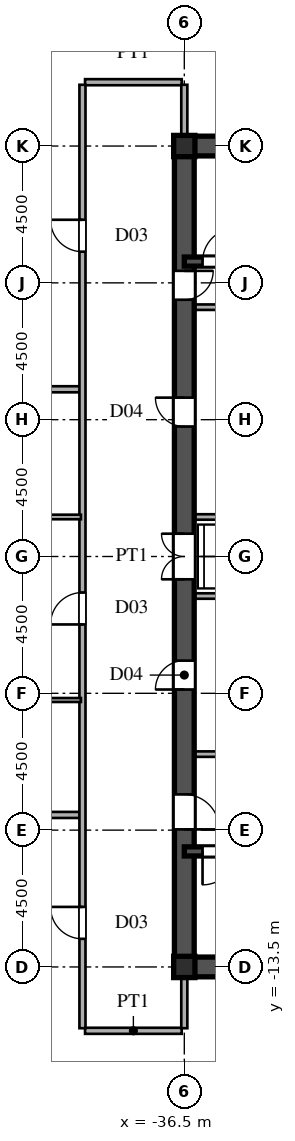
"""IFC4 building model, lengths in metres.
Left out: names, types, materials, properties, quantities, classifications, styles, units other than length and angle.
Written with IfcOpenShell. Run it as: python <this file> out.ifc"""

import sys

from ifc_helpers import new_model, si_unit, direction, frame, frame_2d, origin, origin_2d, place, context, subcontext, project, spatial, rectangle, i_section, extrude, source, transform, mapped, element, fill, save


model = new_model("IFC4")
c1 = context("Model", 3, precision=1e-05, world=origin(), true_north=direction((0.0, 1.0)))
c2 = subcontext(c1, "Body", "Model", "MODEL_VIEW")
j1 = project(units=[si_unit("LENGTHUNIT", "METRE"), si_unit("PLANEANGLEUNIT", "RADIAN")], contexts=[c1])
p1 = place(None, origin())
s1 = spatial("IfcSite", under=j1, at=p1, CompositionType="ELEMENT")
p2 = place(p1, origin())
s2 = spatial("IfcBuilding", under=s1, at=p2, CompositionType="ELEMENT")
p3 = place(p2, frame((0.0, 0.0, 128.4)))
s3 = spatial("IfcBuildingStorey", under=s2, at=p3, CompositionType="ELEMENT", Elevation=128.4)
m1 = source(origin(), c2, "Body", "SweptSolid", [
    extrude(i_section(OverallWidth=0.7, OverallDepth=0.7, WebThickness=0.028, FlangeThickness=0.045, at=origin_2d()), origin(), (0.0, 0.0, 1.0), 3.6),
])
for number, where, z_axis, x_axis in (
    (1, (-36.5, -13.5, 0.0), (0.0, 0.0, 1.0), (1.0, 0.0, 0.0)),
    (2, (-36.5, 13.5, 0.0), (0.0, 0.0, 1.0), (1.0, 0.0, 0.0)),
):
    element("IfcColumn", number, at=place(p3, frame(where, z_axis=z_axis, x_axis=x_axis)), inside=s3, PredefinedType="COLUMN", context=c2, shape_type="MappedRepresentation", body=[
        mapped(m1, transform((0.0, 0.0, 0.0), scale=1.0)),
    ])
for number, where, z_axis, x_axis in (
    (3, (-36.5, -13.5, 0.0), (0.0, 0.0, 1.0), (1.0, 0.0, 0.0)),
    (4, (-36.5, 13.5, 0.0), (0.0, 0.0, 1.0), (1.0, 0.0, 0.0)),
):
    element("IfcWall", number, at=place(p3, frame(where, z_axis=z_axis, x_axis=x_axis)), inside=s3, PredefinedType="SHEAR", context=c2, shape_type="SweptSolid", body=[
        extrude(rectangle(XDim=9.0, YDim=0.65, at=frame_2d((4.5, 0.0))), origin(), (0.0, 0.0, 1.0), 3.38),
    ])
p4 = place(p3, frame((-36.5, -13.65, 0.0), z_axis=(0.0, 0.0, 1.0), x_axis=(0.0, 1.0, 0.0)))
e5 = element("IfcWall", 5, at=p4, inside=s3, PredefinedType="SHEAR", context=c2, shape_type="SweptSolid", body=[
    extrude(rectangle(XDim=7.15, YDim=0.65, at=frame_2d((3.575, 0.0))), origin(), (0.0, 0.0, 1.0), 3.38),
])
p5 = place(p4, frame((4.675, 0.0, 0.0)))
e6 = element("IfcOpeningElement", 6, at=p5, cuts=e5, PredefinedType="OPENING", context=c2, shape_type="SweptSolid", body=[
    extrude(rectangle(XDim=1.15, YDim=2.2, at=frame_2d((0.575, 1.1))), frame((0.0, 0.335, 0.0), z_axis=(0.0, -1.0, 0.0), x_axis=(1.0, 0.0, 0.0)), (0.0, 0.0, 1.0), 0.67),
])
p6 = place(p3, frame((-36.5, -1.3, 0.0), z_axis=(0.0, 0.0, 1.0), x_axis=(0.0, 1.0, 0.0)))
e7 = element("IfcWall", 7, at=p6, inside=s3, PredefinedType="SHEAR", context=c2, shape_type="SweptSolid", body=[
    extrude(rectangle(XDim=2.6, YDim=0.65, at=frame_2d((1.3, 0.0))), origin(), (0.0, 0.0, 1.0), 3.38),
])
p7 = place(p6, frame((0.55, 0.0, 0.0)))
e8 = element("IfcOpeningElement", 8, at=p7, cuts=e7, PredefinedType="OPENING", context=c2, shape_type="SweptSolid", body=[
    extrude(rectangle(XDim=1.5, YDim=2.3, at=frame_2d((0.75, 1.15))), frame((0.0, 0.335, 0.0), z_axis=(0.0, -1.0, 0.0), x_axis=(1.0, 0.0, 0.0)), (0.0, 0.0, 1.0), 0.67),
])
p8 = place(p3, frame((-36.5, 8.2, 0.0), z_axis=(0.0, 0.0, 1.0), x_axis=(0.0, 1.0, 0.0)))
e9 = element("IfcWall", 9, at=p8, inside=s3, PredefinedType="SHEAR", context=c2, shape_type="SweptSolid", body=[
    extrude(rectangle(XDim=5.45, YDim=0.65, at=frame_2d((2.725, 0.0))), origin(), (0.0, 0.0, 1.0), 3.38),
])
p9 = place(p8, frame((0.245, 0.0, 0.0)))
e10 = element("IfcOpeningElement", 10, at=p9, cuts=e9, PredefinedType="OPENING", context=c2, shape_type="SweptSolid", body=[
    extrude(rectangle(XDim=0.95, YDim=2.15, at=frame_2d((0.475, 1.075))), frame((0.0, 0.335, 0.0), z_axis=(0.0, -1.0, 0.0), x_axis=(1.0, 0.0, 0.0)), (0.0, 0.0, 1.0), 0.67),
])
p10 = place(p3, frame((-36.5, -6.5, 0.0), z_axis=(0.0, 0.0, 1.0), x_axis=(0.0, 1.0, 0.0)))
e11 = element("IfcWall", 11, at=p10, inside=s3, PredefinedType="SHEAR", context=c2, shape_type="SweptSolid", body=[
    extrude(rectangle(XDim=5.2, YDim=0.65, at=frame_2d((2.6, 0.0))), origin(), (0.0, 0.0, 1.0), 3.38),
])
p11 = place(p10, frame((2.125, 0.0, 0.0)))
e12 = element("IfcOpeningElement", 12, at=p11, cuts=e11, PredefinedType="OPENING", context=c2, shape_type="SweptSolid", body=[
    extrude(rectangle(XDim=0.95, YDim=2.15, at=frame_2d((0.475, 1.075))), frame((0.0, 0.335, 0.0), z_axis=(0.0, -1.0, 0.0), x_axis=(1.0, 0.0, 0.0)), (0.0, 0.0, 1.0), 0.67),
])
p12 = place(p3, frame((-36.5, 1.3, 0.0), z_axis=(0.0, 0.0, 1.0), x_axis=(0.0, 1.0, 0.0)))
e13 = element("IfcWall", 13, at=p12, inside=s3, PredefinedType="SHEAR", context=c2, shape_type="SweptSolid", body=[
    extrude(rectangle(XDim=6.9, YDim=0.65, at=frame_2d((3.45, 0.0))), origin(), (0.0, 0.0, 1.0), 3.38),
])
p13 = place(p12, frame((2.975, 0.0, 0.0)))
e14 = element("IfcOpeningElement", 14, at=p13, cuts=e13, PredefinedType="OPENING", context=c2, shape_type="SweptSolid", body=[
    extrude(rectangle(XDim=0.95, YDim=2.15, at=frame_2d((0.475, 1.075))), frame((0.0, 0.335, 0.0), z_axis=(0.0, -1.0, 0.0), x_axis=(1.0, 0.0, 0.0)), (0.0, 0.0, 1.0), 0.67),
])
p14 = place(p3, frame((-36.5, -9.7, 0.0), z_axis=(0.0, 0.0, 1.0), x_axis=(1.0, 0.0, 0.0)))
e15 = element("IfcWall", 15, at=p14, inside=s3, PredefinedType="SHEAR", context=c2, shape_type="SweptSolid", body=[
    extrude(rectangle(XDim=9.0, YDim=0.3, at=frame_2d((4.5, 0.0))), origin(), (0.0, 0.0, 1.0), 3.38),
])
p15 = place(p14, frame((0.6, 0.0, 0.0)))
e16 = element("IfcOpeningElement", 16, at=p15, cuts=e15, PredefinedType="OPENING", context=c2, shape_type="SweptSolid", body=[
    extrude(rectangle(XDim=1.1, YDim=2.2, at=frame_2d((0.55, 1.1))), frame((0.0, 0.16, 0.0), z_axis=(0.0, -1.0, 0.0), x_axis=(1.0, 0.0, 0.0)), (0.0, 0.0, 1.0), 0.32),
])
p16 = place(p3, frame((-36.5, 9.7, 0.0), z_axis=(0.0, 0.0, 1.0), x_axis=(1.0, 0.0, 0.0)))
e17 = element("IfcWall", 17, at=p16, inside=s3, PredefinedType="SHEAR", context=c2, shape_type="SweptSolid", body=[
    extrude(rectangle(XDim=9.0, YDim=0.3, at=frame_2d((4.5, 0.0))), origin(), (0.0, 0.0, 1.0), 3.38),
])
p17 = place(p16, frame((0.6, 0.0, 0.0)))
e18 = element("IfcOpeningElement", 18, at=p17, cuts=e17, PredefinedType="OPENING", context=c2, shape_type="SweptSolid", body=[
    extrude(rectangle(XDim=1.1, YDim=2.2, at=frame_2d((0.55, 1.1))), frame((0.0, 0.16, 0.0), z_axis=(0.0, -1.0, 0.0), x_axis=(1.0, 0.0, 0.0)), (0.0, 0.0, 1.0), 0.32),
])
for number, where, z_axis, x_axis in (
    (19, (-36.15, -6.5, 0.0), (0.0, 0.0, 1.0), (1.0, 0.0, 0.0)),
    (20, (-36.15, 8.2, 0.0), (0.0, 0.0, 1.0), (1.0, 0.0, 0.0)),
):
    element("IfcWall", number, at=place(p3, frame(where, z_axis=z_axis, x_axis=x_axis)), inside=s3, PredefinedType="PARTITIONING", context=c2, shape_type="SweptSolid", body=[
        extrude(rectangle(XDim=5.7, YDim=0.18, at=frame_2d((2.85, 0.0))), origin(), (0.0, 0.0, 1.0), 3.38),
    ])
for number, where, z_axis, x_axis in (
    (21, (-36.15, -1.3, 0.0), (0.0, 0.0, 1.0), (1.0, 0.0, 0.0)),
    (22, (-36.15, 1.3, 0.0), (0.0, 0.0, 1.0), (1.0, 0.0, 0.0)),
):
    element("IfcWall", number, at=place(p3, frame(where, z_axis=z_axis, x_axis=x_axis)), inside=s3, PredefinedType="PARTITIONING", context=c2, shape_type="SweptSolid", body=[
        extrude(rectangle(XDim=2.95, YDim=0.18, at=frame_2d((1.475, 0.0))), origin(), (0.0, 0.0, 1.0), 3.38),
    ])
p18 = place(p3, frame((-39.765, -15.6, 0.0), z_axis=(0.0, 0.0, 1.0), x_axis=(1.0, 0.0, 0.0)))
e23 = element("IfcWall", 23, at=p18, inside=s3, PredefinedType="PARTITIONING", context=c2, shape_type="SweptSolid", body=[
    extrude(rectangle(XDim=3.18, YDim=0.2, at=frame_2d((1.59, 0.0))), origin(), (0.0, 0.0, 1.0), 3.38),
])
p19 = place(p3, frame((-62.69, -8.5, 0.0), z_axis=(0.0, 0.0, 1.0), x_axis=(1.0, 0.0, 0.0)))
e24 = element("IfcWall", 24, at=p19, inside=s3, PredefinedType="PARTITIONING", context=c2, shape_type="SweptSolid", body=[
    extrude(rectangle(XDim=22.76, YDim=0.2, at=frame_2d((11.38, 0.0))), origin(), (0.0, 0.0, 1.0), 3.38),
])
p20 = place(p3, frame((-45.45, -4.72, 0.0), z_axis=(0.0, 0.0, 1.0), x_axis=(1.0, 0.0, 0.0)))
e25 = element("IfcWall", 25, at=p20, inside=s3, PredefinedType="PARTITIONING", context=c2, shape_type="SweptSolid", body=[
    extrude(rectangle(XDim=5.55, YDim=0.13, at=frame_2d((2.775, 0.0))), origin(), (0.0, 0.0, 1.0), 3.38),
])
p21 = place(p20, frame((2.335, 0.0, 0.0)))
e26 = element("IfcOpeningElement", 26, at=p21, cuts=e25, PredefinedType="OPENING", context=c2, shape_type="SweptSolid", body=[
    extrude(rectangle(XDim=0.88, YDim=2.1, at=frame_2d((0.44, 1.05))), frame((0.0, 0.075, 0.0), z_axis=(0.0, -1.0, 0.0), x_axis=(1.0, 0.0, 0.0)), (0.0, 0.0, 1.0), 0.15),
])
p22 = place(p3, frame((-45.45, 1.3, 0.0), z_axis=(0.0, 0.0, 1.0), x_axis=(1.0, 0.0, 0.0)))
e27 = element("IfcWall", 27, at=p22, inside=s3, PredefinedType="PARTITIONING", context=c2, shape_type="SweptSolid", body=[
    extrude(rectangle(XDim=5.55, YDim=0.15, at=frame_2d((2.775, 0.0))), origin(), (0.0, 0.0, 1.0), 3.38),
])
p23 = place(p22, frame((2.3, 0.0, 0.0)))
e28 = element("IfcOpeningElement", 28, at=p23, cuts=e27, PredefinedType="OPENING", context=c2, shape_type="SweptSolid", body=[
    extrude(rectangle(XDim=0.95, YDim=2.15, at=frame_2d((0.475, 1.075))), frame((0.0, 0.085, 0.0), z_axis=(0.0, -1.0, 0.0), x_axis=(1.0, 0.0, 0.0)), (0.0, 0.0, 1.0), 0.17),
])
p24 = place(p3, frame((-68.458, 5.5, 0.0), z_axis=(0.0, 0.0, 1.0), x_axis=(1.0, 0.0, 0.0)))
e29 = element("IfcWall", 29, at=p24, inside=s3, PredefinedType="PARTITIONING", context=c2, shape_type="SweptSolid", body=[
    extrude(rectangle(XDim=28.529, YDim=0.2, at=frame_2d((14.264, 0.0))), origin(), (0.0, 0.0, 1.0), 3.38),
])
p25 = place(p3, frame((-39.765, 15.6, 0.0), z_axis=(0.0, 0.0, 1.0), x_axis=(1.0, 0.0, 0.0)))
e30 = element("IfcWall", 30, at=p25, inside=s3, PredefinedType="PARTITIONING", context=c2, shape_type="SweptSolid", body=[
    extrude(rectangle(XDim=3.18, YDim=0.2, at=frame_2d((1.59, 0.0))), origin(), (0.0, 0.0, 1.0), 3.38),
])
p26 = place(p3, frame((-39.85, -15.515, 0.0), z_axis=(0.0, 0.0, 1.0), x_axis=(0.0, 1.0, 0.0)))
e31 = element("IfcWall", 31, at=p26, inside=s3, PredefinedType="PARTITIONING", context=c2, shape_type="SweptSolid", body=[
    extrude(rectangle(XDim=31.03, YDim=0.2, at=frame_2d((15.515, 0.0))), origin(), (0.0, 0.0, 1.0), 3.38),
])
p27 = place(p26, frame((2.94, 0.0, 0.0)))
e32 = element("IfcOpeningElement", 32, at=p27, cuts=e31, PredefinedType="OPENING", context=c2, shape_type="SweptSolid", body=[
    extrude(rectangle(XDim=1.05, YDim=2.25, at=frame_2d((0.525, 1.125))), frame((0.0, 0.11, 0.0), z_axis=(0.0, -1.0, 0.0), x_axis=(1.0, 0.0, 0.0)), (0.0, 0.0, 1.0), 0.22),
])
p28 = place(p26, frame((13.28, 0.0, 0.0)))
e33 = element("IfcOpeningElement", 33, at=p28, cuts=e31, PredefinedType="OPENING", context=c2, shape_type="SweptSolid", body=[
    extrude(rectangle(XDim=1.05, YDim=2.25, at=frame_2d((0.525, 1.125))), frame((0.0, 0.11, 0.0), z_axis=(0.0, -1.0, 0.0), x_axis=(1.0, 0.0, 0.0)), (0.0, 0.0, 1.0), 0.22),
])
p29 = place(p26, frame((25.54, 0.0, 0.0)))
e34 = element("IfcOpeningElement", 34, at=p29, cuts=e31, PredefinedType="OPENING", context=c2, shape_type="SweptSolid", body=[
    extrude(rectangle(XDim=1.05, YDim=2.25, at=frame_2d((0.525, 1.125))), frame((0.0, 0.11, 0.0), z_axis=(0.0, -1.0, 0.0), x_axis=(1.0, 0.0, 0.0)), (0.0, 0.0, 1.0), 0.22),
])
for number, where, z_axis, x_axis in (
    (35, (-36.5, -15.515, 0.0), (0.0, 0.0, 1.0), (0.0, 1.0, 0.0)),
    (36, (-36.5, 13.83, 0.0), (0.0, 0.0, 1.0), (0.0, 1.0, 0.0)),
):
    element("IfcWall", number, at=place(p3, frame(where, z_axis=z_axis, x_axis=x_axis)), inside=s3, PredefinedType="PARTITIONING", context=c2, shape_type="SweptSolid", body=[
        extrude(rectangle(XDim=1.685, YDim=0.2, at=frame_2d((0.842, 0.0))), origin(), (0.0, 0.0, 1.0), 2.78),
    ])
m2 = source(origin(), c2, "Body", "SweptSolid", [
    extrude(rectangle(XDim=1.15, YDim=2.2, at=frame_2d((0.575, 1.1))), frame((0.0, 0.025, 0.0), z_axis=(0.0, -1.0, 0.0), x_axis=(1.0, 0.0, 0.0)), (0.0, 0.0, 1.0), 0.05),
])
p30 = place(p5, frame((1.15, 0.0, 0.0), z_axis=(0.0, 0.0, 1.0), x_axis=(-1.0, 0.0, 0.0)))
e37 = element("IfcDoor", 37, at=p30, inside=s3, OperationType="SINGLE_SWING_LEFT", PredefinedType="DOOR", context=c2, shape_type="MappedRepresentation", body=[
    mapped(m2, transform((0.0, 0.0, 0.0), scale=1.0)),
])
fill(e6, e37)
m3 = source(origin(), c2, "Body", "SweptSolid", [
    extrude(rectangle(XDim=1.5, YDim=2.3, at=frame_2d((0.75, 1.15))), frame((0.0, 0.025, 0.0), z_axis=(0.0, -1.0, 0.0), x_axis=(1.0, 0.0, 0.0)), (0.0, 0.0, 1.0), 0.05),
])
p31 = place(p7, origin())
e38 = element("IfcDoor", 38, at=p31, inside=s3, OperationType="DOUBLE_SWING_LEFT", PredefinedType="DOOR", context=c2, shape_type="MappedRepresentation", body=[
    mapped(m3, transform((0.0, 0.0, 0.0), scale=1.0)),
])
fill(e8, e38)
m4 = source(origin(), c2, "Body", "SweptSolid", [
    extrude(rectangle(XDim=0.95, YDim=2.15, at=frame_2d((0.475, 1.075))), frame((0.0, 0.025, 0.0), z_axis=(0.0, -1.0, 0.0), x_axis=(1.0, 0.0, 0.0)), (0.0, 0.0, 1.0), 0.05),
])
p32 = place(p9, frame((0.95, 0.0, 0.0), z_axis=(0.0, 0.0, 1.0), x_axis=(-1.0, 0.0, 0.0)))
e39 = element("IfcDoor", 39, at=p32, inside=s3, OperationType="SINGLE_SWING_RIGHT", PredefinedType="DOOR", context=c2, shape_type="MappedRepresentation", body=[
    mapped(m4, transform((0.0, 0.0, 0.0), scale=1.0)),
])
fill(e10, e39)
p33 = place(p11, origin())
e40 = element("IfcDoor", 40, at=p33, inside=s3, OperationType="SINGLE_SWING_LEFT", PredefinedType="DOOR", context=c2, shape_type="MappedRepresentation", body=[
    mapped(m4, transform((0.0, 0.0, 0.0), scale=1.0)),
])
fill(e12, e40)
p34 = place(p13, origin())
e41 = element("IfcDoor", 41, at=p34, inside=s3, OperationType="SINGLE_SWING_RIGHT", PredefinedType="DOOR", context=c2, shape_type="MappedRepresentation", body=[
    mapped(m4, transform((0.0, 0.0, 0.0), scale=1.0)),
])
fill(e14, e41)
m5 = source(origin(), c2, "Body", "SweptSolid", [
    extrude(rectangle(XDim=1.1, YDim=2.2, at=frame_2d((0.55, 1.1))), frame((0.0, 0.025, 0.0), z_axis=(0.0, -1.0, 0.0), x_axis=(1.0, 0.0, 0.0)), (0.0, 0.0, 1.0), 0.05),
])
p35 = place(p15, frame((1.1, 0.0, 0.0), z_axis=(0.0, 0.0, 1.0), x_axis=(-1.0, 0.0, 0.0)))
e42 = element("IfcDoor", 42, at=p35, inside=s3, OperationType="SINGLE_SWING_LEFT", PredefinedType="DOOR", context=c2, shape_type="MappedRepresentation", body=[
    mapped(m5, transform((0.0, 0.0, 0.0), scale=1.0)),
])
fill(e16, e42)
p36 = place(p17, origin())
e43 = element("IfcDoor", 43, at=p36, inside=s3, OperationType="SINGLE_SWING_RIGHT", PredefinedType="DOOR", context=c2, shape_type="MappedRepresentation", body=[
    mapped(m5, transform((0.0, 0.0, 0.0), scale=1.0)),
])
fill(e18, e43)
m6 = source(origin(), c2, "Body", "SweptSolid", [
    extrude(rectangle(XDim=1.05, YDim=2.25, at=frame_2d((0.525, 1.125))), frame((0.0, 0.025, 0.0), z_axis=(0.0, -1.0, 0.0), x_axis=(1.0, 0.0, 0.0)), (0.0, 0.0, 1.0), 0.05),
])
p37 = place(p27, origin())
e44 = element("IfcDoor", 44, at=p37, inside=s3, OperationType="SINGLE_SWING_RIGHT", PredefinedType="DOOR", context=c2, shape_type="MappedRepresentation", body=[
    mapped(m6, transform((0.0, 0.0, 0.0), scale=1.0)),
])
fill(e32, e44)
p38 = place(p28, origin())
e45 = element("IfcDoor", 45, at=p38, inside=s3, OperationType="SINGLE_SWING_LEFT", PredefinedType="DOOR", context=c2, shape_type="MappedRepresentation", body=[
    mapped(m6, transform((0.0, 0.0, 0.0), scale=1.0)),
])
fill(e33, e45)
p39 = place(p29, origin())
e46 = element("IfcDoor", 46, at=p39, inside=s3, OperationType="SINGLE_SWING_RIGHT", PredefinedType="DOOR", context=c2, shape_type="MappedRepresentation", body=[
    mapped(m6, transform((0.0, 0.0, 0.0), scale=1.0)),
])
fill(e34, e46)
save(model, sys.argv[1])
